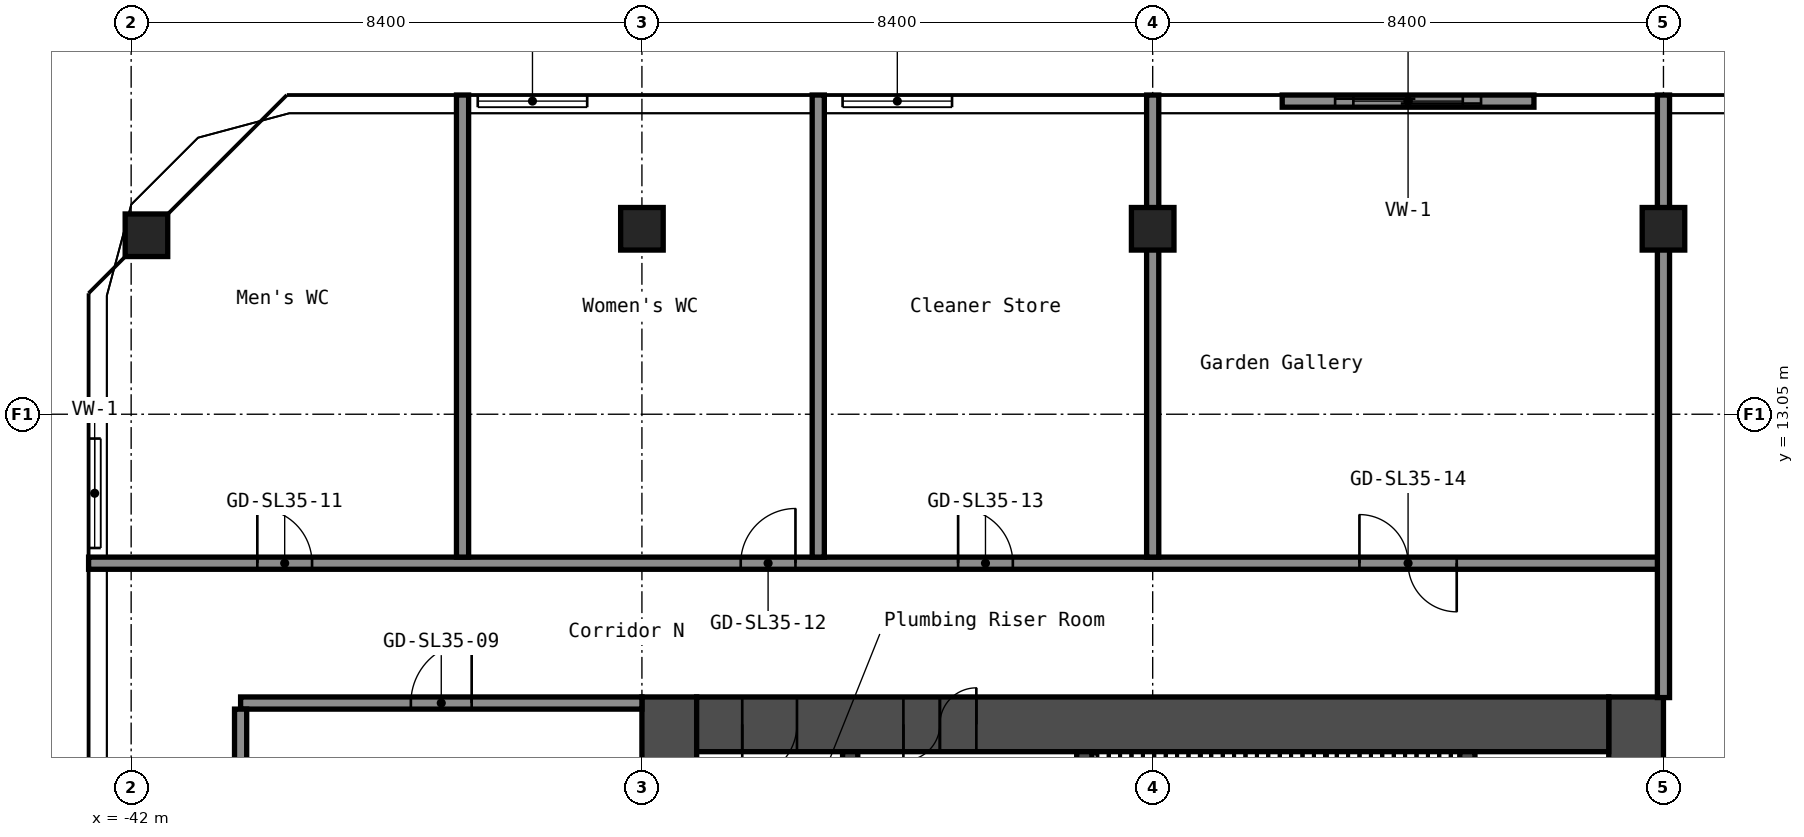
"""IFC4 building model, lengths in metres.
Left out: names, types, materials, properties, quantities, classifications, styles, units other than length and angle.
Written with IfcOpenShell. Run it as: python <this file> out.ifc"""

import sys

from ifc_helpers import new_model, si_unit, direction, frame, frame_2d, origin, origin_2d, place, context, subcontext, project, spatial, rectangle, hollow_rectangle, extrude, element, fill, save


model = new_model("IFC4")
c1 = context("Model", 3, precision=1e-05, world=origin(), true_north=direction((0.0, 1.0)))
c2 = subcontext(c1, "Body", "Model", "MODEL_VIEW")
j1 = project(units=[si_unit("LENGTHUNIT", "METRE"), si_unit("PLANEANGLEUNIT", "RADIAN")], contexts=[c1])
p1 = place(None, origin())
s1 = spatial("IfcSite", under=j1, at=p1, CompositionType="ELEMENT")
p2 = place(p1, origin())
s2 = spatial("IfcBuilding", under=s1, at=p2, CompositionType="ELEMENT")
p3 = place(p2, frame((0.0, 0.0, 124.6)))
s3 = spatial("IfcBuildingStorey", under=s2, at=p3, CompositionType="ELEMENT", Elevation=124.6)
for number, where, z_axis, x_axis in (
    (1, (-41.749, 15.994, 0.0), (0.0, 0.0, 1.0), (1.0, 0.0, 0.0)),
    (2, (-33.6, 16.1, 0.0), (0.0, 0.0, 1.0), (1.0, 0.0, 0.0)),
    (3, (-25.2, 16.1, 0.0), (0.0, 0.0, 1.0), (1.0, 0.0, 0.0)),
    (4, (-16.8, 16.1, 0.0), (0.0, 0.0, 1.0), (1.0, 0.0, 0.0)),
):
    element("IfcColumn", number, at=place(p3, frame(where, z_axis=z_axis, x_axis=x_axis)), inside=s3, PredefinedType="COLUMN", context=c2, shape_type="SweptSolid", body=[
        extrude(hollow_rectangle(XDim=0.7, YDim=0.7, WallThickness=0.028, at=origin_2d()), origin(), (0.0, 0.0, 1.0), 5.95),
    ])
p4 = place(p3, frame((-17.25, -8.4, 0.0), z_axis=(0.0, 0.0, 1.0), x_axis=(0.0, 1.0, 0.0)))
e5 = element("IfcWall", 5, at=p4, inside=s3, PredefinedType="SHEAR", context=c2, shape_type="SweptSolid", body=[
    extrude(rectangle(XDim=16.8, YDim=0.9, at=frame_2d((8.4, 0.0))), origin(), (0.0, 0.0, 1.0), 5.95),
])
p5 = place(p4, frame((7.1, 0.0, 0.0)))
e6 = element("IfcOpeningElement", 6, at=p5, cuts=e5, PredefinedType="OPENING", context=c2, shape_type="SweptSolid", body=[
    extrude(rectangle(XDim=1.6, YDim=2.1, at=frame_2d((0.8, 1.05))), frame((0.0, 0.46, 0.0), z_axis=(0.0, -1.0, 0.0), x_axis=(1.0, 0.0, 0.0)), (0.0, 0.0, 1.0), 0.92),
])
p6 = place(p3, frame((-33.15, -8.4, 0.0), z_axis=(0.0, 0.0, 1.0), x_axis=(0.0, 1.0, 0.0)))
e7 = element("IfcWall", 7, at=p6, inside=s3, PredefinedType="SHEAR", context=c2, shape_type="SweptSolid", body=[
    extrude(rectangle(XDim=16.8, YDim=0.9, at=frame_2d((8.4, 0.0))), origin(), (0.0, 0.0, 1.0), 5.95),
])
p7 = place(p3, frame((-32.7, 7.95, 0.0), z_axis=(0.0, 0.0, 1.0), x_axis=(1.0, 0.0, 0.0)))
e8 = element("IfcWall", 8, at=p7, inside=s3, PredefinedType="SHEAR", context=c2, shape_type="SweptSolid", body=[
    extrude(rectangle(XDim=15.0, YDim=0.9, at=frame_2d((7.5, 0.0))), origin(), (0.0, 0.0, 1.0), 5.95),
])
p8 = place(p7, frame((3.4, 0.0, 0.0)))
e9 = element("IfcOpeningElement", 9, at=p8, cuts=e8, PredefinedType="OPENING", context=c2, shape_type="SweptSolid", body=[
    extrude(rectangle(XDim=1.2, YDim=2.1, at=frame_2d((0.6, 1.05))), frame((0.0, 0.46, 0.0), z_axis=(0.0, -1.0, 0.0), x_axis=(1.0, 0.0, 0.0)), (0.0, 0.0, 1.0), 0.92),
])
p9 = place(p7, frame((0.75, 0.0, 0.0)))
e10 = element("IfcOpeningElement", 10, at=p9, cuts=e8, PredefinedType="OPENING", context=c2, shape_type="SweptSolid", body=[
    extrude(rectangle(XDim=0.9, YDim=2.1, at=frame_2d((0.45, 1.05))), frame((0.0, 0.46, 0.0), z_axis=(0.0, -1.0, 0.0), x_axis=(1.0, 0.0, 0.0)), (0.0, 0.0, 1.0), 0.92),
])
p10 = place(p3, frame((-20.025, 1.2, 0.0), z_axis=(0.0, 0.0, 1.0), x_axis=(0.0, 1.0, 0.0)))
e11 = element("IfcWall", 11, at=p10, inside=s3, PredefinedType="SHEAR", context=c2, shape_type="SweptSolid", body=[
    extrude(rectangle(XDim=6.3, YDim=0.25, at=frame_2d((3.15, 0.0))), origin(), (0.0, 0.0, 1.0), 5.95),
])
p11 = place(p3, frame((-26.325, 3.75, 0.0), z_axis=(0.0, 0.0, 1.0), x_axis=(0.0, 1.0, 0.0)))
e12 = element("IfcWall", 12, at=p11, inside=s3, PredefinedType="SHEAR", context=c2, shape_type="SweptSolid", body=[
    extrude(rectangle(XDim=3.75, YDim=0.25, at=frame_2d((1.875, 0.0))), origin(), (0.0, 0.0, 1.0), 5.95),
])
p12 = place(p11, frame((1.25, 0.0, 0.0)))
e13 = element("IfcOpeningElement", 13, at=p12, cuts=e12, PredefinedType="OPENING", context=c2, shape_type="SweptSolid", body=[
    extrude(rectangle(XDim=1.2, YDim=2.1, at=frame_2d((0.6, 1.05))), frame((0.0, 0.135, 0.0), z_axis=(0.0, -1.0, 0.0), x_axis=(1.0, 0.0, 0.0)), (0.0, 0.0, 1.0), 0.27),
])
p13 = place(p3, frame((-30.175, 1.45, 0.0), z_axis=(0.0, 0.0, 1.0), x_axis=(0.0, 1.0, 0.0)))
e14 = element("IfcWall", 14, at=p13, inside=s3, PredefinedType="SHEAR", context=c2, shape_type="SweptSolid", body=[
    extrude(rectangle(XDim=6.05, YDim=0.25, at=frame_2d((3.025, 0.0))), origin(), (0.0, 0.0, 1.0), 5.95),
])
p14 = place(p13, frame((2.625, 0.0, 0.0)))
e15 = element("IfcOpeningElement", 15, at=p14, cuts=e14, PredefinedType="OPENING", context=c2, shape_type="SweptSolid", body=[
    extrude(rectangle(XDim=1.1, YDim=2.1, at=frame_2d((0.55, 1.05))), frame((0.0, 0.135, 0.0), z_axis=(0.0, -1.0, 0.0), x_axis=(1.0, 0.0, 0.0)), (0.0, 0.0, 1.0), 0.27),
])
p15 = place(p3, frame((-40.2, 8.3, 0.0), z_axis=(0.0, 0.0, 1.0), x_axis=(1.0, 0.0, 0.0)))
e16 = element("IfcWall", 16, at=p15, inside=s3, PredefinedType="PARTITIONING", context=c2, shape_type="SweptSolid", body=[
    extrude(rectangle(XDim=6.6, YDim=0.2, at=frame_2d((3.3, 0.0))), origin(), (0.0, 0.0, 1.0), 5.95),
])
p16 = place(p15, frame((2.8, 0.0, 0.0)))
e17 = element("IfcOpeningElement", 17, at=p16, cuts=e16, PredefinedType="OPENING", context=c2, shape_type="SweptSolid", body=[
    extrude(rectangle(XDim=1.0, YDim=2.1, at=frame_2d((0.5, 1.05))), frame((0.0, 0.11, 0.0), z_axis=(0.0, -1.0, 0.0), x_axis=(1.0, 0.0, 0.0)), (0.0, 0.0, 1.0), 0.22),
])
p17 = place(p3, frame((-42.7, 10.6, 0.0), z_axis=(0.0, 0.0, 1.0), x_axis=(1.0, 0.0, 0.0)))
e18 = element("IfcWall", 18, at=p17, inside=s3, PredefinedType="PARTITIONING", context=c2, shape_type="SweptSolid", body=[
    extrude(rectangle(XDim=25.9, YDim=0.2, at=frame_2d((12.95, 0.0))), origin(), (0.0, 0.0, 1.0), 5.95),
])
p18 = place(p17, frame((2.775, 0.0, 0.0)))
e19 = element("IfcOpeningElement", 19, at=p18, cuts=e18, PredefinedType="OPENING", context=c2, shape_type="SweptSolid", body=[
    extrude(rectangle(XDim=0.9, YDim=2.1, at=frame_2d((0.45, 1.05))), frame((0.0, 0.11, 0.0), z_axis=(0.0, -1.0, 0.0), x_axis=(1.0, 0.0, 0.0)), (0.0, 0.0, 1.0), 0.22),
])
p19 = place(p17, frame((10.725, 0.0, 0.0)))
e20 = element("IfcOpeningElement", 20, at=p19, cuts=e18, PredefinedType="OPENING", context=c2, shape_type="SweptSolid", body=[
    extrude(rectangle(XDim=0.9, YDim=2.1, at=frame_2d((0.45, 1.05))), frame((0.0, 0.11, 0.0), z_axis=(0.0, -1.0, 0.0), x_axis=(1.0, 0.0, 0.0)), (0.0, 0.0, 1.0), 0.22),
])
p20 = place(p17, frame((14.3, 0.0, 0.0)))
e21 = element("IfcOpeningElement", 21, at=p20, cuts=e18, PredefinedType="OPENING", context=c2, shape_type="SweptSolid", body=[
    extrude(rectangle(XDim=0.9, YDim=2.1, at=frame_2d((0.45, 1.05))), frame((0.0, 0.11, 0.0), z_axis=(0.0, -1.0, 0.0), x_axis=(1.0, 0.0, 0.0)), (0.0, 0.0, 1.0), 0.22),
])
p21 = place(p17, frame((20.9, 0.0, 0.0)))
e22 = element("IfcOpeningElement", 22, at=p21, cuts=e18, PredefinedType="OPENING", context=c2, shape_type="SweptSolid", body=[
    extrude(rectangle(XDim=1.6, YDim=2.1, at=frame_2d((0.8, 1.05))), frame((0.0, 0.11, 0.0), z_axis=(0.0, -1.0, 0.0), x_axis=(1.0, 0.0, 0.0)), (0.0, 0.0, 1.0), 0.22),
])
p22 = place(p3, frame((-40.2, -8.2, 0.0), z_axis=(0.0, 0.0, 1.0), x_axis=(0.0, 1.0, 0.0)))
e23 = element("IfcWall", 23, at=p22, inside=s3, PredefinedType="PARTITIONING", context=c2, shape_type="SweptSolid", body=[
    extrude(rectangle(XDim=16.4, YDim=0.2, at=frame_2d((8.2, 0.0))), origin(), (0.0, 0.0, 1.0), 5.95),
])
for number, where, z_axis, x_axis in (
    (24, (-36.55, 10.7, 0.0), (0.0, 0.0, 1.0), (0.0, 1.0, 0.0)),
    (25, (-30.7, 10.7, 0.0), (0.0, 0.0, 1.0), (0.0, 1.0, 0.0)),
    (26, (-25.2, 10.7, 0.0), (0.0, 0.0, 1.0), (0.0, 1.0, 0.0)),
):
    element("IfcWall", number, at=place(p3, frame(where, z_axis=z_axis, x_axis=x_axis)), inside=s3, PredefinedType="PARTITIONING", context=c2, shape_type="SweptSolid", body=[
        extrude(rectangle(XDim=7.6, YDim=0.2, at=frame_2d((3.8, 0.0))), origin(), (0.0, 0.0, 1.0), 5.95),
    ])
p23 = place(p3, frame((-16.8, 8.39, 0.0), z_axis=(0.0, 0.0, 1.0), x_axis=(0.0, 1.0, 0.0)))
e27 = element("IfcWall", 27, at=p23, inside=s3, PredefinedType="PARTITIONING", context=c2, shape_type="SweptSolid", body=[
    extrude(rectangle(XDim=9.91, YDim=0.2, at=frame_2d((4.955, 0.0))), origin(), (0.0, 0.0, 1.0), 5.95),
])
p24 = place(p3, frame((-16.8, 18.2, 4.45), z_axis=(0.0, 0.0, 1.0), x_axis=(-1.0, 0.0, 0.0)))
p25 = place(p24, frame((3.3, 0.0, 0.25)))
p26 = place(p25, origin())
e28 = element("IfcWindow", 28, at=p26, inside=s3, PartitioningType="SINGLE_PANEL", PredefinedType="WINDOW", context=c2, shape_type="SweptSolid", body=[
    extrude(rectangle(XDim=1.8, YDim=0.9, at=frame_2d((0.9, 0.45))), frame((0.0, 0.03, 0.0), z_axis=(0.0, -1.0, 0.0), x_axis=(1.0, 0.0, 0.0)), (0.0, 0.0, 1.0), 0.06),
])
p27 = place(p3, frame((-25.2, 18.2, 4.45), z_axis=(0.0, 0.0, 1.0), x_axis=(-1.0, 0.0, 0.0)))
p28 = place(p27, frame((3.3, 0.0, 0.25)))
p29 = place(p28, origin())
e29 = element("IfcWindow", 29, at=p29, inside=s3, PartitioningType="SINGLE_PANEL", PredefinedType="WINDOW", context=c2, shape_type="SweptSolid", body=[
    extrude(rectangle(XDim=1.8, YDim=0.9, at=frame_2d((0.9, 0.45))), frame((0.0, 0.03, 0.0), z_axis=(0.0, -1.0, 0.0), x_axis=(1.0, 0.0, 0.0)), (0.0, 0.0, 1.0), 0.06),
])
p30 = place(p3, frame((-33.6, 18.2, 4.45), z_axis=(0.0, 0.0, 1.0), x_axis=(-1.0, 0.0, 0.0)))
p31 = place(p30, frame((0.9, 0.0, 0.25)))
p32 = place(p31, origin())
e30 = element("IfcWindow", 30, at=p32, inside=s3, PartitioningType="SINGLE_PANEL", PredefinedType="WINDOW", context=c2, shape_type="SweptSolid", body=[
    extrude(rectangle(XDim=1.8, YDim=0.9, at=frame_2d((0.9, 0.45))), frame((0.0, 0.03, 0.0), z_axis=(0.0, -1.0, 0.0), x_axis=(1.0, 0.0, 0.0)), (0.0, 0.0, 1.0), 0.06),
])
p33 = place(p3, frame((-18.93, 18.2, 0.0), z_axis=(0.0, 0.0, 1.0), x_axis=(-1.0, 0.0, 0.0)))
p34 = place(p33, frame((0.87, 0.0, 0.0)))
p35 = place(p34, frame((2.4, 0.0, 0.0), z_axis=(0.0, 0.0, 1.0), x_axis=(-1.0, 0.0, 0.0)))
e31 = element("IfcDoor", 31, at=p35, inside=s3, OperationType="SLIDING_TO_LEFT", PredefinedType="DOOR", context=c2, shape_type="SweptSolid", body=[
    extrude(rectangle(XDim=2.4, YDim=2.2, at=frame_2d((1.2, 1.1))), frame((0.0, 0.025, 0.0), z_axis=(0.0, -1.0, 0.0), x_axis=(1.0, 0.0, 0.0)), (0.0, 0.0, 1.0), 0.05),
])
p36 = place(p3, frame((-42.6, 15.01, 4.45), z_axis=(0.0, 0.0, 1.0), x_axis=(0.0, -1.0, 0.0)))
p37 = place(p36, frame((2.359, 0.0, 0.25)))
p38 = place(p37, origin())
e32 = element("IfcWindow", 32, at=p38, inside=s3, PartitioningType="SINGLE_PANEL", PredefinedType="WINDOW", context=c2, shape_type="SweptSolid", body=[
    extrude(rectangle(XDim=1.8, YDim=0.9, at=frame_2d((0.9, 0.45))), frame((0.0, 0.03, 0.0), z_axis=(0.0, -1.0, 0.0), x_axis=(1.0, 0.0, 0.0)), (0.0, 0.0, 1.0), 0.06),
])
p39 = place(p8, origin())
e33 = element("IfcDoor", 33, at=p39, inside=s3, OperationType="DOUBLE_DOOR_SINGLE_SWING", PredefinedType="DOOR", context=c2, shape_type="SweptSolid", body=[
    extrude(rectangle(XDim=1.2, YDim=2.1, at=frame_2d((0.6, 1.05))), frame((0.0, 0.025, 0.0), z_axis=(0.0, -1.0, 0.0), x_axis=(1.0, 0.0, 0.0)), (0.0, 0.0, 1.0), 0.05),
])
fill(e9, e33)
p40 = place(p9, origin())
e34 = element("IfcDoor", 34, at=p40, inside=s3, OperationType="SINGLE_SWING_LEFT", PredefinedType="DOOR", context=c2, shape_type="SweptSolid", body=[
    extrude(rectangle(XDim=0.9, YDim=2.1, at=frame_2d((0.45, 1.05))), frame((0.0, 0.025, 0.0), z_axis=(0.0, -1.0, 0.0), x_axis=(1.0, 0.0, 0.0)), (0.0, 0.0, 1.0), 0.05),
])
fill(e10, e34)
p41 = place(p16, origin())
e35 = element("IfcDoor", 35, at=p41, inside=s3, OperationType="SINGLE_SWING_LEFT", PredefinedType="DOOR", context=c2, shape_type="SweptSolid", body=[
    extrude(rectangle(XDim=1.0, YDim=2.1, at=frame_2d((0.5, 1.05))), frame((0.0, 0.025, 0.0), z_axis=(0.0, -1.0, 0.0), x_axis=(1.0, 0.0, 0.0)), (0.0, 0.0, 1.0), 0.05),
])
fill(e17, e35)
p42 = place(p18, origin())
e36 = element("IfcDoor", 36, at=p42, inside=s3, OperationType="SINGLE_SWING_RIGHT", PredefinedType="DOOR", context=c2, shape_type="SweptSolid", body=[
    extrude(rectangle(XDim=0.9, YDim=2.1, at=frame_2d((0.45, 1.05))), frame((0.0, 0.025, 0.0), z_axis=(0.0, -1.0, 0.0), x_axis=(1.0, 0.0, 0.0)), (0.0, 0.0, 1.0), 0.05),
])
fill(e19, e36)
p43 = place(p19, origin())
e37 = element("IfcDoor", 37, at=p43, inside=s3, OperationType="SINGLE_SWING_LEFT", PredefinedType="DOOR", context=c2, shape_type="SweptSolid", body=[
    extrude(rectangle(XDim=0.9, YDim=2.1, at=frame_2d((0.45, 1.05))), frame((0.0, 0.025, 0.0), z_axis=(0.0, -1.0, 0.0), x_axis=(1.0, 0.0, 0.0)), (0.0, 0.0, 1.0), 0.05),
])
fill(e20, e37)
p44 = place(p20, origin())
e38 = element("IfcDoor", 38, at=p44, inside=s3, OperationType="SINGLE_SWING_RIGHT", PredefinedType="DOOR", context=c2, shape_type="SweptSolid", body=[
    extrude(rectangle(XDim=0.9, YDim=2.1, at=frame_2d((0.45, 1.05))), frame((0.0, 0.025, 0.0), z_axis=(0.0, -1.0, 0.0), x_axis=(1.0, 0.0, 0.0)), (0.0, 0.0, 1.0), 0.05),
])
fill(e21, e38)
p45 = place(p21, origin())
e39 = element("IfcDoor", 39, at=p45, inside=s3, OperationType="DOUBLE_DOOR_SINGLE_SWING", PredefinedType="DOOR", context=c2, shape_type="SweptSolid", body=[
    extrude(rectangle(XDim=1.6, YDim=2.1, at=frame_2d((0.8, 1.05))), frame((0.0, 0.025, 0.0), z_axis=(0.0, -1.0, 0.0), x_axis=(1.0, 0.0, 0.0)), (0.0, 0.0, 1.0), 0.05),
])
fill(e22, e39)
save(model, sys.argv[1])
